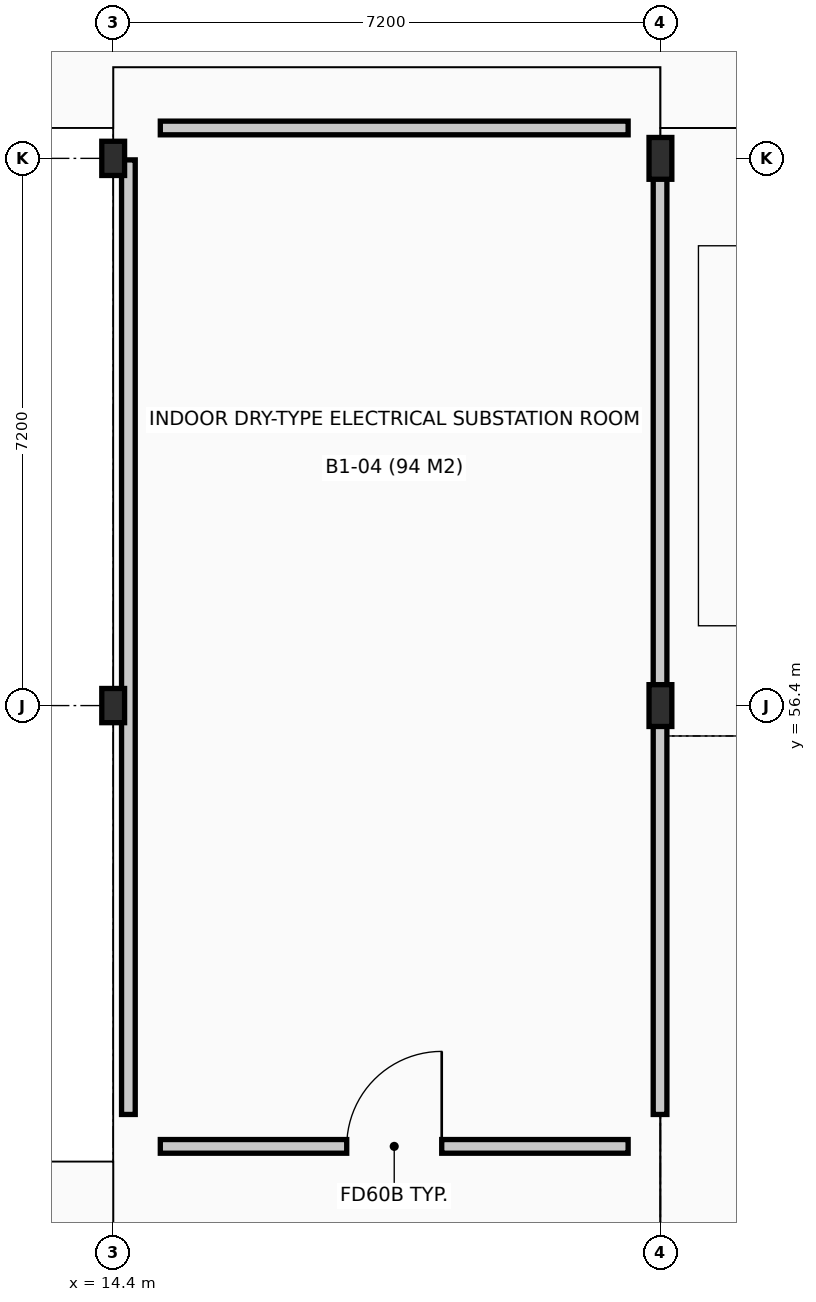
"""IFC4 building model, lengths in metres.
Left out: names, types, materials, properties, quantities, classifications, styles, units other than length and angle.
Written with IfcOpenShell. Run it as: python <this file> out.ifc"""

import sys

from ifc_helpers import new_model, si_unit, direction, frame, frame_2d, origin, origin_2d, place, context, subcontext, project, spatial, rectangle, i_section, extrude, element, fill, save


model = new_model("IFC4")
c1 = context("Model", 3, precision=1e-05, world=origin(), true_north=direction((0.0, 1.0)))
c2 = subcontext(c1, "Body", "Model", "MODEL_VIEW")
j1 = project(units=[si_unit("LENGTHUNIT", "METRE"), si_unit("PLANEANGLEUNIT", "RADIAN")], contexts=[c1])
p1 = place(None, origin())
s1 = spatial("IfcSite", under=j1, at=p1, CompositionType="ELEMENT")
p2 = place(p1, origin())
s2 = spatial("IfcBuilding", under=s1, at=p2, CompositionType="ELEMENT")
p3 = place(p2, frame((0.0, 0.0, -4.8)))
s3 = spatial("IfcBuildingStorey", under=s2, at=p3, CompositionType="ELEMENT", Elevation=-4.8)
for number, where, z_axis, x_axis in (
    (1, (14.4, 56.4, 0.0), (0.0, 0.0, 1.0), (1.0, 0.0, 0.0)),
    (2, (14.4, 63.6, 0.0), (0.0, 0.0, 1.0), (1.0, 0.0, 0.0)),
):
    element("IfcColumn", number, at=place(p3, frame(where, z_axis=z_axis, x_axis=x_axis)), inside=s3, PredefinedType="COLUMN", context=c2, shape_type="SweptSolid", body=[
        extrude(i_section(OverallWidth=0.3, OverallDepth=0.45, WebThickness=0.014, FlangeThickness=0.026, at=origin_2d()), origin(), (0.0, 0.0, 1.0), 4.8),
    ])
for number, where, z_axis, x_axis in (
    (3, (21.6, 56.4, 0.0), (0.0, 0.0, 1.0), (1.0, 0.0, 0.0)),
    (4, (21.6, 63.6, 0.0), (0.0, 0.0, 1.0), (1.0, 0.0, 0.0)),
):
    element("IfcColumn", number, at=place(p3, frame(where, z_axis=z_axis, x_axis=x_axis)), inside=s3, PredefinedType="COLUMN", context=c2, shape_type="SweptSolid", body=[
        extrude(i_section(OverallWidth=0.3, OverallDepth=0.55, WebThickness=0.015, FlangeThickness=0.029, at=origin_2d()), origin(), (0.0, 0.0, 1.0), 4.8),
    ])
p4 = place(p3, frame((15.02, 50.6, 0.0), z_axis=(0.0, 0.0, 1.0), x_axis=(1.0, 0.0, 0.0)))
e5 = element("IfcWall", 5, at=p4, inside=s3, PredefinedType="PARTITIONING", context=c2, shape_type="SweptSolid", body=[
    extrude(rectangle(XDim=6.155, YDim=0.18, at=frame_2d((3.078, 0.0))), origin(), (0.0, 0.0, 1.0), 4.535),
])
p5 = place(p4, frame((2.452, 0.0, 0.0)))
e6 = element("IfcOpeningElement", 6, at=p5, cuts=e5, PredefinedType="OPENING", context=c2, shape_type="SweptSolid", body=[
    extrude(rectangle(XDim=1.25, YDim=2.15, at=frame_2d((0.625, 1.075))), frame((0.0, 0.1, 0.0), z_axis=(0.0, -1.0, 0.0), x_axis=(1.0, 0.0, 0.0)), (0.0, 0.0, 1.0), 0.2),
])
p6 = place(p3, frame((15.02, 64.0, 0.0), z_axis=(0.0, 0.0, 1.0), x_axis=(1.0, 0.0, 0.0)))
e7 = element("IfcWall", 7, at=p6, inside=s3, PredefinedType="PARTITIONING", context=c2, shape_type="SweptSolid", body=[
    extrude(rectangle(XDim=6.155, YDim=0.18, at=frame_2d((3.078, 0.0))), origin(), (0.0, 0.0, 1.0), 4.535),
])
for number, where, z_axis, x_axis in (
    (8, (14.6, 51.02, 0.0), (0.0, 0.0, 1.0), (0.0, 1.0, 0.0)),
    (9, (21.595, 51.02, 0.0), (0.0, 0.0, 1.0), (0.0, 1.0, 0.0)),
):
    element("IfcWall", number, at=place(p3, frame(where, z_axis=z_axis, x_axis=x_axis)), inside=s3, PredefinedType="PARTITIONING", context=c2, shape_type="SweptSolid", body=[
        extrude(rectangle(XDim=12.56, YDim=0.18, at=frame_2d((6.28, 0.0))), origin(), (0.0, 0.0, 1.0), 3.63),
    ])
p7 = place(p5, origin())
e10 = element("IfcDoor", 10, at=p7, inside=s3, OperationType="SINGLE_SWING_RIGHT", PredefinedType="DOOR", context=c2, shape_type="SweptSolid", body=[
    extrude(rectangle(XDim=1.25, YDim=2.15, at=frame_2d((0.625, 1.075))), frame((0.0, 0.025, 0.0), z_axis=(0.0, -1.0, 0.0), x_axis=(1.0, 0.0, 0.0)), (0.0, 0.0, 1.0), 0.05),
])
fill(e6, e10)
save(model, sys.argv[1])
